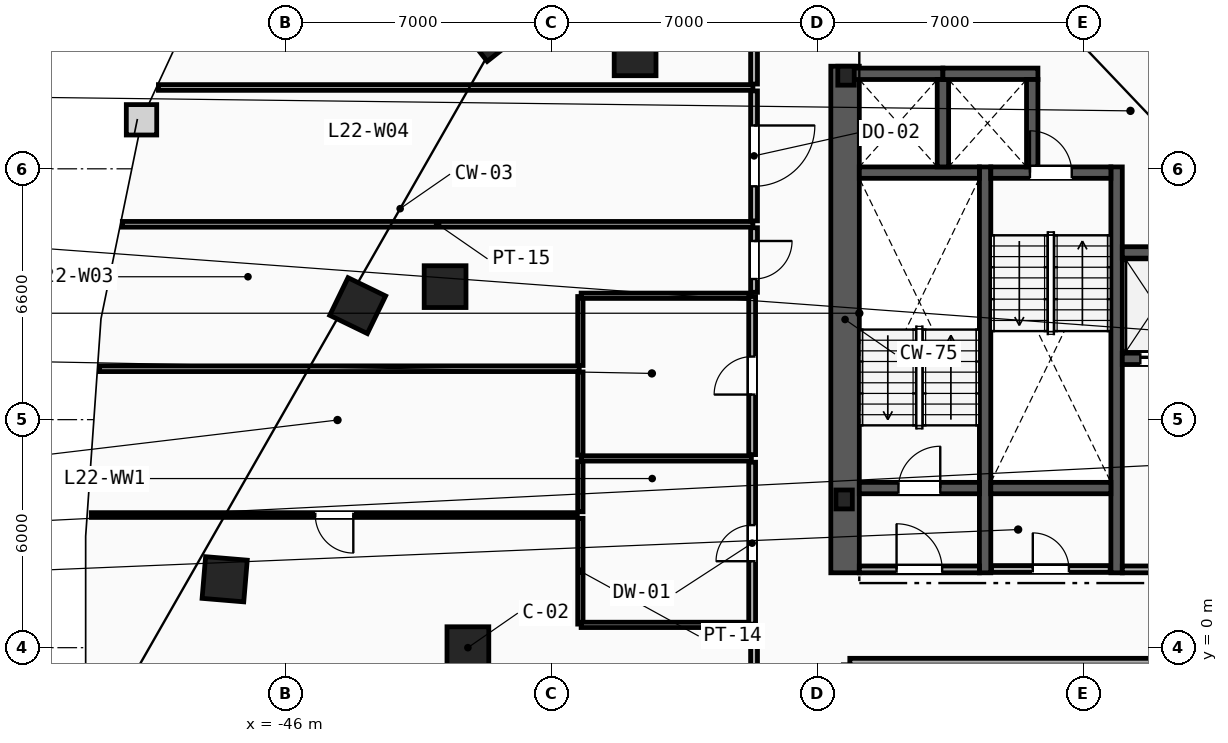
"""IFC4 building model, lengths in metres.
Left out: names, types, materials, properties, quantities, classifications, styles, units other than length and angle.
Written with IfcOpenShell. Run it as: python <this file> out.ifc"""

import sys

from ifc_helpers import new_model, si_unit, direction, frame, frame_2d, origin, origin_2d, place, context, subcontext, project, spatial, rectangle, i_section, extrude, element, fill, save


model = new_model("IFC4")
c1 = context("Model", 3, precision=1e-05, world=origin(), true_north=direction((0.0, 1.0)))
c2 = subcontext(c1, "Body", "Model", "MODEL_VIEW")
j1 = project(units=[si_unit("LENGTHUNIT", "METRE"), si_unit("PLANEANGLEUNIT", "RADIAN")], contexts=[c1])
p1 = place(None, origin())
s1 = spatial("IfcSite", under=j1, at=p1, CompositionType="ELEMENT")
p2 = place(p1, origin())
s2 = spatial("IfcBuilding", under=s1, at=p2, CompositionType="ELEMENT")
p3 = place(p2, frame((0.0, 0.0, 89.0)))
s3 = spatial("IfcBuildingStorey", under=s2, at=p3, CompositionType="ELEMENT", Elevation=89.0)
for number, where, z_axis, x_axis in (
    (1, (-31.3, 3.9, 0.0), (0.0, 0.0, 1.0), (1.0, 0.0, 0.0)),
    (2, (-31.25, 15.05, 0.0), (0.0, 0.0, 1.0), (1.0, 0.0, 0.0)),
):
    element("IfcColumn", number, at=place(p3, frame(where, z_axis=z_axis, x_axis=x_axis)), inside=s3, PredefinedType="COLUMN", context=c2, shape_type="SweptSolid", body=[
        extrude(i_section(OverallWidth=0.432, OverallDepth=0.498, WebThickness=0.056, FlangeThickness=0.089, FilletRadius=0.018, at=origin_2d()), origin(), (0.0, 0.0, 1.0), 3.6),
    ])
for number, where, z_axis, x_axis in (
    (3, (-41.2, 0.0, 0.0), (0.0, 0.0, 1.0), (1.0, 0.0, 0.0)),
    (4, (-41.8, 9.5, 0.0), (0.0, 0.0, 1.0), (1.0, 0.0, 0.0)),
    (5, (-36.8, 15.6, 0.0), (0.0, 0.0, 1.0), (1.0, 0.0, 0.0)),
    (6, (-40.6, 16.2, 0.0), (0.0, 0.0, 1.0), (-0.785, -0.619, 0.0)),
    (7, (-44.1, 9.0, 0.0), (0.0, 0.0, 1.0), (-0.437, -0.899, 0.0)),
    (8, (-47.6, 1.8, 0.0), (0.0, 0.0, 1.0), (-0.084, -0.997, 0.0)),
):
    element("IfcColumn", number, at=place(p3, frame(where, z_axis=z_axis, x_axis=x_axis)), inside=s3, PredefinedType="COLUMN", context=c2, shape_type="SweptSolid", body=[
        extrude(rectangle(XDim=1.1, YDim=1.1, at=origin_2d()), origin(), (0.0, 0.0, 1.0), 3.6),
    ])
p4 = place(p3, frame((-31.275, 1.97, 0.0), z_axis=(0.0, 0.0, 1.0), x_axis=(0.0, 1.0, 0.0)))
e9 = element("IfcWall", 9, at=p4, inside=s3, PredefinedType="SHEAR", context=c2, shape_type="SweptSolid", body=[
    extrude(rectangle(XDim=13.33, YDim=0.75, at=frame_2d((6.665, 0.0))), origin(), (0.0, 0.0, 1.0), 3.3),
])
for number, where, z_axis, x_axis in (
    (10, (-27.59, 1.97, 0.0), (0.0, 0.0, 1.0), (0.0, 1.0, 0.0)),
    (11, (-24.13, 1.97, 0.0), (0.0, 0.0, 1.0), (0.0, 1.0, 0.0)),
):
    element("IfcWall", number, at=place(p3, frame(where, z_axis=z_axis, x_axis=x_axis)), inside=s3, PredefinedType="SHEAR", context=c2, shape_type="SweptSolid", body=[
        extrude(rectangle(XDim=10.68, YDim=0.3, at=frame_2d((5.34, 0.0))), origin(), (0.0, 0.0, 1.0), 3.3),
    ])
p5 = place(p3, frame((-30.9, 4.2, 0.0), z_axis=(0.0, 0.0, 1.0), x_axis=(1.0, 0.0, 0.0)))
e12 = element("IfcWall", 12, at=p5, inside=s3, PredefinedType="SHEAR", context=c2, shape_type="SweptSolid", body=[
    extrude(rectangle(XDim=3.16, YDim=0.3, at=frame_2d((1.58, 0.0))), origin(), (0.0, 0.0, 1.0), 3.3),
])
p6 = place(p5, frame((1.03, 0.0, 0.0)))
e13 = element("IfcOpeningElement", 13, at=p6, cuts=e12, PredefinedType="OPENING", context=c2, shape_type="SweptSolid", body=[
    extrude(rectangle(XDim=1.1, YDim=2.15, at=frame_2d((0.55, 1.075))), frame((0.0, 0.16, 0.0), z_axis=(0.0, -1.0, 0.0), x_axis=(1.0, 0.0, 0.0)), (0.0, 0.0, 1.0), 0.32),
])
p7 = place(p3, frame((-30.9, 12.5, 0.0), z_axis=(0.0, 0.0, 1.0), x_axis=(1.0, 0.0, 0.0)))
e14 = element("IfcWall", 14, at=p7, inside=s3, PredefinedType="SHEAR", context=c2, shape_type="SweptSolid", body=[
    extrude(rectangle(XDim=3.16, YDim=0.3, at=frame_2d((1.58, 0.0))), origin(), (0.0, 0.0, 1.0), 3.3),
])
p8 = place(p3, frame((-27.44, 12.5, 0.0), z_axis=(0.0, 0.0, 1.0), x_axis=(1.0, 0.0, 0.0)))
e15 = element("IfcWall", 15, at=p8, inside=s3, PredefinedType="SHEAR", context=c2, shape_type="SweptSolid", body=[
    extrude(rectangle(XDim=3.16, YDim=0.3, at=frame_2d((1.58, 0.0))), origin(), (0.0, 0.0, 1.0), 3.3),
])
p9 = place(p8, frame((1.03, 0.0, 0.0)))
e16 = element("IfcOpeningElement", 16, at=p9, cuts=e15, PredefinedType="OPENING", context=c2, shape_type="SweptSolid", body=[
    extrude(rectangle(XDim=1.1, YDim=2.15, at=frame_2d((0.55, 1.075))), frame((0.0, 0.16, 0.0), z_axis=(0.0, -1.0, 0.0), x_axis=(1.0, 0.0, 0.0)), (0.0, 0.0, 1.0), 0.32),
])
p10 = place(p3, frame((-27.44, 4.2, 0.0), z_axis=(0.0, 0.0, 1.0), x_axis=(1.0, 0.0, 0.0)))
e17 = element("IfcWall", 17, at=p10, inside=s3, PredefinedType="SHEAR", context=c2, shape_type="SweptSolid", body=[
    extrude(rectangle(XDim=3.16, YDim=0.3, at=frame_2d((1.58, 0.0))), origin(), (0.0, 0.0, 1.0), 3.3),
])
p11 = place(p3, frame((-23.98, 2.06, 0.0), z_axis=(0.0, 0.0, 1.0), x_axis=(1.0, 0.0, 0.0)))
e18 = element("IfcWall", 18, at=p11, inside=s3, PredefinedType="PARTITIONING", context=c2, shape_type="SweptSolid", body=[
    extrude(rectangle(XDim=3.0, YDim=0.18, at=frame_2d((1.5, 0.0))), origin(), (0.0, 0.0, 1.0), 3.3),
])
p12 = place(p11, frame((0.9, 0.0, 0.0)))
e19 = element("IfcOpeningElement", 19, at=p12, cuts=e18, PredefinedType="OPENING", context=c2, shape_type="SweptSolid", body=[
    extrude(rectangle(XDim=1.2, YDim=2.15, at=frame_2d((0.6, 1.075))), frame((0.0, 0.1, 0.0), z_axis=(0.0, -1.0, 0.0), x_axis=(1.0, 0.0, 0.0)), (0.0, 0.0, 1.0), 0.2),
])
p13 = place(p3, frame((-30.9, 2.06, 0.0), z_axis=(0.0, 0.0, 1.0), x_axis=(1.0, 0.0, 0.0)))
e20 = element("IfcWall", 20, at=p13, inside=s3, PredefinedType="PARTITIONING", context=c2, shape_type="SweptSolid", body=[
    extrude(rectangle(XDim=3.16, YDim=0.18, at=frame_2d((1.58, 0.0))), origin(), (0.0, 0.0, 1.0), 3.3),
])
p14 = place(p13, frame((0.98, 0.0, 0.0)))
e21 = element("IfcOpeningElement", 21, at=p14, cuts=e20, PredefinedType="OPENING", context=c2, shape_type="SweptSolid", body=[
    extrude(rectangle(XDim=1.2, YDim=2.15, at=frame_2d((0.6, 1.075))), frame((0.0, 0.1, 0.0), z_axis=(0.0, -1.0, 0.0), x_axis=(1.0, 0.0, 0.0)), (0.0, 0.0, 1.0), 0.2),
])
p15 = place(p3, frame((-23.98, 7.6, 0.0), z_axis=(0.0, 0.0, 1.0), x_axis=(1.0, 0.0, 0.0)))
e22 = element("IfcWall", 22, at=p15, inside=s3, PredefinedType="SHEAR", context=c2, shape_type="SweptSolid", body=[
    extrude(rectangle(XDim=2.1, YDim=0.3, at=frame_2d((1.05, 0.0))), origin(), (0.0, 0.0, 1.0), 3.3),
])
p16 = place(p15, frame((0.475, 0.0, 0.0)))
e23 = element("IfcOpeningElement", 23, at=p16, cuts=e22, PredefinedType="OPENING", context=c2, shape_type="SweptSolid", body=[
    extrude(rectangle(XDim=1.15, YDim=2.2, at=frame_2d((0.575, 1.1))), frame((0.0, 0.16, 0.0), z_axis=(0.0, -1.0, 0.0), x_axis=(1.0, 0.0, 0.0)), (0.0, 0.0, 1.0), 0.32),
])
p17 = place(p3, frame((-23.98, 10.4, 0.0), z_axis=(0.0, 0.0, 1.0), x_axis=(1.0, 0.0, 0.0)))
e24 = element("IfcWall", 24, at=p17, inside=s3, PredefinedType="SHEAR", context=c2, shape_type="SweptSolid", body=[
    extrude(rectangle(XDim=2.1, YDim=0.3, at=frame_2d((1.05, 0.0))), origin(), (0.0, 0.0, 1.0), 3.3),
])
p18 = place(p3, frame((-31.2, 15.1, 0.0), z_axis=(0.0, 0.0, 1.0), x_axis=(1.0, 0.0, 0.0)))
e25 = element("IfcWall", 25, at=p18, inside=s3, PredefinedType="SHEAR", context=c2, shape_type="SweptSolid", body=[
    extrude(rectangle(XDim=2.5, YDim=0.3, at=frame_2d((1.25, 0.0))), origin(), (0.0, 0.0, 1.0), 3.3),
])
p19 = place(p3, frame((-28.7, 12.65, 0.0), z_axis=(0.0, 0.0, 1.0), x_axis=(0.0, 1.0, 0.0)))
e26 = element("IfcWall", 26, at=p19, inside=s3, PredefinedType="SHEAR", context=c2, shape_type="SweptSolid", body=[
    extrude(rectangle(XDim=2.3, YDim=0.3, at=frame_2d((1.15, 0.0))), origin(), (0.0, 0.0, 1.0), 3.3),
])
p20 = place(p3, frame((-28.7, 15.1, 0.0), z_axis=(0.0, 0.0, 1.0), x_axis=(1.0, 0.0, 0.0)))
e27 = element("IfcWall", 27, at=p20, inside=s3, PredefinedType="SHEAR", context=c2, shape_type="SweptSolid", body=[
    extrude(rectangle(XDim=2.5, YDim=0.3, at=frame_2d((1.25, 0.0))), origin(), (0.0, 0.0, 1.0), 3.3),
])
p21 = place(p3, frame((-26.35, 12.65, 0.0), z_axis=(0.0, 0.0, 1.0), x_axis=(0.0, 1.0, 0.0)))
e28 = element("IfcWall", 28, at=p21, inside=s3, PredefinedType="SHEAR", context=c2, shape_type="SweptSolid", body=[
    extrude(rectangle(XDim=2.3, YDim=0.3, at=frame_2d((1.15, 0.0))), origin(), (0.0, 0.0, 1.0), 3.3),
])
p22 = place(p3, frame((-27.42, 2.07, 0.0), z_axis=(0.0, 0.0, 1.0), x_axis=(1.0, 0.0, 0.0)))
e29 = element("IfcWall", 29, at=p22, inside=s3, PredefinedType="PARTITIONING", context=c2, shape_type="SweptSolid", body=[
    extrude(rectangle(XDim=3.12, YDim=0.18, at=frame_2d((1.56, 0.0))), origin(), (0.0, 0.0, 1.0), 3.3),
])
p23 = place(p22, frame((1.085, 0.0, 0.0)))
e30 = element("IfcOpeningElement", 30, at=p23, cuts=e29, PredefinedType="OPENING", context=c2, shape_type="SweptSolid", body=[
    extrude(rectangle(XDim=0.95, YDim=2.1, at=frame_2d((0.475, 1.05))), frame((0.0, 0.1, 0.0), z_axis=(0.0, -1.0, 0.0), x_axis=(1.0, 0.0, 0.0)), (0.0, 0.0, 1.0), 0.2),
])
p24 = place(p3, frame((-38.24, 0.62, 0.0), z_axis=(0.0, 0.0, 1.0), x_axis=(0.0, 1.0, 0.0)))
e31 = element("IfcWall", 31, at=p24, inside=s3, PredefinedType="PARTITIONING", context=c2, shape_type="SweptSolid", body=[
    extrude(rectangle(XDim=2.785, YDim=0.14, at=frame_2d((1.393, 0.0))), origin(), (0.0, 0.0, 1.0), 3.3),
])
p25 = place(p3, frame((-38.24, 3.575, 0.0), z_axis=(0.0, 0.0, 1.0), x_axis=(0.0, 1.0, 0.0)))
e32 = element("IfcWall", 32, at=p25, inside=s3, PredefinedType="PARTITIONING", context=c2, shape_type="SweptSolid", body=[
    extrude(rectangle(XDim=1.32, YDim=0.14, at=frame_2d((0.66, 0.0))), origin(), (0.0, 0.0, 1.0), 3.3),
])
p26 = place(p3, frame((-38.24, 5.065, 0.0), z_axis=(0.0, 0.0, 1.0), x_axis=(0.0, 1.0, 0.0)))
e33 = element("IfcWall", 33, at=p26, inside=s3, PredefinedType="PARTITIONING", context=c2, shape_type="SweptSolid", body=[
    extrude(rectangle(XDim=2.19, YDim=0.14, at=frame_2d((1.095, 0.0))), origin(), (0.0, 0.0, 1.0), 3.3),
])
p27 = place(p3, frame((-38.24, 7.425, 0.0), z_axis=(0.0, 0.0, 1.0), x_axis=(0.0, 1.0, 0.0)))
e34 = element("IfcWall", 34, at=p27, inside=s3, PredefinedType="PARTITIONING", context=c2, shape_type="SweptSolid", body=[
    extrude(rectangle(XDim=1.815, YDim=0.14, at=frame_2d((0.907, 0.0))), origin(), (0.0, 0.0, 1.0), 3.3),
])
for number, where, z_axis, x_axis in (
    (35, (-38.22, 0.6, 0.0), (0.0, 0.0, 1.0), (1.0, 0.0, 0.0)),
    (36, (-38.22, 4.98, 0.0), (0.0, 0.0, 1.0), (1.0, 0.0, 0.0)),
    (37, (-38.22, 9.26, 0.0), (0.0, 0.0, 1.0), (1.0, 0.0, 0.0)),
):
    element("IfcWall", number, at=place(p3, frame(where, z_axis=z_axis, x_axis=x_axis)), inside=s3, PredefinedType="PARTITIONING", context=c2, shape_type="SweptSolid", body=[
        extrude(rectangle(XDim=4.48, YDim=0.14, at=frame_2d((2.24, 0.0))), origin(), (0.0, 0.0, 1.0), 3.3),
    ])
p28 = place(p3, frame((-33.72, 0.62, 0.0), z_axis=(0.0, 0.0, 1.0), x_axis=(0.0, 1.0, 0.0)))
e38 = element("IfcWall", 38, at=p28, inside=s3, PredefinedType="PARTITIONING", context=c2, shape_type="SweptSolid", body=[
    extrude(rectangle(XDim=4.26, YDim=0.18, at=frame_2d((2.13, 0.0))), origin(), (0.0, 0.0, 1.0), 3.3),
])
p29 = place(p28, frame((1.655, 0.0, 0.0)))
e39 = element("IfcOpeningElement", 39, at=p29, cuts=e38, PredefinedType="OPENING", context=c2, shape_type="SweptSolid", body=[
    extrude(rectangle(XDim=0.95, YDim=2.1, at=frame_2d((0.475, 1.05))), frame((0.0, 0.1, 0.0), z_axis=(0.0, -1.0, 0.0), x_axis=(1.0, 0.0, 0.0)), (0.0, 0.0, 1.0), 0.2),
])
p30 = place(p3, frame((-33.72, 5.08, 0.0), z_axis=(0.0, 0.0, 1.0), x_axis=(0.0, 1.0, 0.0)))
e40 = element("IfcWall", 40, at=p30, inside=s3, PredefinedType="PARTITIONING", context=c2, shape_type="SweptSolid", body=[
    extrude(rectangle(XDim=4.16, YDim=0.18, at=frame_2d((2.08, 0.0))), origin(), (0.0, 0.0, 1.0), 3.3),
])
p31 = place(p30, frame((1.58, 0.0, 0.0)))
e41 = element("IfcOpeningElement", 41, at=p31, cuts=e40, PredefinedType="OPENING", context=c2, shape_type="SweptSolid", body=[
    extrude(rectangle(XDim=1.0, YDim=2.15, at=frame_2d((0.5, 1.075))), frame((0.0, 0.1, 0.0), z_axis=(0.0, -1.0, 0.0), x_axis=(1.0, 0.0, 0.0)), (0.0, 0.0, 1.0), 0.2),
])
p32 = place(p3, frame((-50.897, 7.34, 0.0), z_axis=(0.0, 0.0, 1.0), x_axis=(1.0, 0.0, 0.0)))
e42 = element("IfcWall", 42, at=p32, inside=s3, PredefinedType="PARTITIONING", context=c2, shape_type="SweptSolid", body=[
    extrude(rectangle(XDim=12.627, YDim=0.15, at=frame_2d((6.314, 0.0))), origin(), (0.0, 0.0, 1.0), 3.3),
])
p33 = place(p3, frame((-50.293, 11.14, 0.0), z_axis=(0.0, 0.0, 1.0), x_axis=(1.0, 0.0, 0.0)))
e43 = element("IfcWall", 43, at=p33, inside=s3, PredefinedType="PARTITIONING", context=c2, shape_type="SweptSolid", body=[
    extrude(rectangle(XDim=16.593, YDim=0.15, at=frame_2d((8.296, 0.0))), origin(), (0.0, 0.0, 1.0), 3.3),
])
p34 = place(p3, frame((-49.343, 14.74, 0.0), z_axis=(0.0, 0.0, 1.0), x_axis=(1.0, 0.0, 0.0)))
e44 = element("IfcWall", 44, at=p34, inside=s3, PredefinedType="PARTITIONING", context=c2, shape_type="SweptSolid", body=[
    extrude(rectangle(XDim=15.643, YDim=0.15, at=frame_2d((7.822, 0.0))), origin(), (0.0, 0.0, 1.0), 3.3),
])
p35 = place(p3, frame((-31.15, -0.37, 0.0), z_axis=(0.0, 0.0, 1.0), x_axis=(1.0, 0.0, 0.0)))
e45 = element("IfcWall", 45, at=p35, inside=s3, PredefinedType="PARTITIONING", context=c2, shape_type="SweptSolid", body=[
    extrude(rectangle(XDim=14.328, YDim=0.18, at=frame_2d((7.164, 0.0))), origin(), (0.0, 0.0, 1.0), 3.3),
])
p36 = place(p3, frame((-33.67, 0.509, 0.0), z_axis=(0.0, 0.0, 1.0), x_axis=(0.0, -1.0, 0.0)))
e46 = element("IfcWall", 46, at=p36, inside=s3, PredefinedType="PARTITIONING", context=c2, shape_type="SweptSolid", body=[
    extrude(rectangle(XDim=11.908, YDim=0.18, at=frame_2d((5.954, 0.0))), origin(), (0.0, 0.0, 1.0), 3.3),
])
p37 = place(p3, frame((-33.67, 17.428, 0.0), z_axis=(0.0, 0.0, 1.0), x_axis=(0.0, -1.0, 0.0)))
e47 = element("IfcWall", 47, at=p37, inside=s3, PredefinedType="PARTITIONING", context=c2, shape_type="SweptSolid", body=[
    extrude(rectangle(XDim=2.598, YDim=0.18, at=frame_2d((1.299, 0.0))), origin(), (0.0, 0.0, 1.0), 3.3),
])
p38 = place(p3, frame((-33.67, 11.05, 0.0), z_axis=(0.0, 0.0, 1.0), x_axis=(0.0, -1.0, 0.0)))
e48 = element("IfcWall", 48, at=p38, inside=s3, PredefinedType="PARTITIONING", context=c2, shape_type="SweptSolid", body=[
    extrude(rectangle(XDim=1.699, YDim=0.18, at=frame_2d((0.849, 0.0))), origin(), (0.0, 0.0, 1.0), 3.3),
])
p39 = place(p38, frame((0.349, 0.0, 0.0)))
e49 = element("IfcOpeningElement", 49, at=p39, cuts=e48, PredefinedType="OPENING", context=c2, shape_type="SweptSolid", body=[
    extrude(rectangle(XDim=1.0, YDim=2.15, at=frame_2d((0.5, 1.075))), frame((0.0, 0.1, 0.0), z_axis=(0.0, -1.0, 0.0), x_axis=(1.0, 0.0, 0.0)), (0.0, 0.0, 1.0), 0.2),
])
p40 = place(p3, frame((-33.67, 14.65, 0.0), z_axis=(0.0, 0.0, 1.0), x_axis=(0.0, -1.0, 0.0)))
e50 = element("IfcWall", 50, at=p40, inside=s3, PredefinedType="PARTITIONING", context=c2, shape_type="SweptSolid", body=[
    extrude(rectangle(XDim=3.42, YDim=0.18, at=frame_2d((1.71, 0.0))), origin(), (0.0, 0.0, 1.0), 3.3),
])
p41 = place(p40, frame((0.91, 0.0, 0.0)))
e51 = element("IfcOpeningElement", 51, at=p41, cuts=e50, PredefinedType="OPENING", context=c2, shape_type="SweptSolid", body=[
    extrude(rectangle(XDim=1.6, YDim=2.2, at=frame_2d((0.8, 1.1))), frame((0.0, 0.1, 0.0), z_axis=(0.0, -1.0, 0.0), x_axis=(1.0, 0.0, 0.0)), (0.0, 0.0, 1.0), 0.2),
])
p42 = place(p3, frame((-38.32, 3.49, 0.0), z_axis=(0.0, 0.0, 1.0), x_axis=(-1.0, 0.0, 0.0)))
e52 = element("IfcWall", 52, at=p42, inside=s3, PredefinedType="PARTITIONING", context=c2, shape_type="SweptSolid", body=[
    extrude(rectangle(XDim=12.79, YDim=0.125, at=frame_2d((6.395, 0.0))), origin(), (0.0, 0.0, 1.0), 3.3),
])
p43 = place(p42, frame((5.895, 0.0, 0.0)))
e53 = element("IfcOpeningElement", 53, at=p43, cuts=e52, PredefinedType="OPENING", context=c2, shape_type="SweptSolid", body=[
    extrude(rectangle(XDim=1.0, YDim=2.15, at=frame_2d((0.5, 1.075))), frame((0.0, 0.073, 0.0), z_axis=(0.0, -1.0, 0.0), x_axis=(1.0, 0.0, 0.0)), (0.0, 0.0, 1.0), 0.145),
])
p44 = place(p6, origin())
e54 = element("IfcDoor", 54, at=p44, inside=s3, OperationType="SINGLE_SWING_RIGHT", PredefinedType="DOOR", context=c2, shape_type="SweptSolid", body=[
    extrude(rectangle(XDim=1.1, YDim=2.15, at=frame_2d((0.55, 1.075))), frame((0.0, 0.025, 0.0), z_axis=(0.0, -1.0, 0.0), x_axis=(1.0, 0.0, 0.0)), (0.0, 0.0, 1.0), 0.05),
])
fill(e13, e54)
p45 = place(p9, origin())
e55 = element("IfcDoor", 55, at=p45, inside=s3, OperationType="SINGLE_SWING_LEFT", PredefinedType="DOOR", context=c2, shape_type="SweptSolid", body=[
    extrude(rectangle(XDim=1.1, YDim=2.15, at=frame_2d((0.55, 1.075))), frame((0.0, 0.025, 0.0), z_axis=(0.0, -1.0, 0.0), x_axis=(1.0, 0.0, 0.0)), (0.0, 0.0, 1.0), 0.05),
])
fill(e16, e55)
p46 = place(p14, origin())
e56 = element("IfcDoor", 56, at=p46, inside=s3, OperationType="SINGLE_SWING_LEFT", PredefinedType="DOOR", context=c2, shape_type="SweptSolid", body=[
    extrude(rectangle(XDim=1.2, YDim=2.15, at=frame_2d((0.6, 1.075))), frame((0.0, 0.025, 0.0), z_axis=(0.0, -1.0, 0.0), x_axis=(1.0, 0.0, 0.0)), (0.0, 0.0, 1.0), 0.05),
])
fill(e21, e56)
p47 = place(p16, origin())
e57 = element("IfcDoor", 57, at=p47, inside=s3, OperationType="SLIDING_TO_LEFT", PredefinedType="TRAPDOOR", context=c2, shape_type="SweptSolid", body=[
    extrude(rectangle(XDim=1.15, YDim=2.2, at=frame_2d((0.575, 1.1))), frame((0.0, 0.025, 0.0), z_axis=(0.0, -1.0, 0.0), x_axis=(1.0, 0.0, 0.0)), (0.0, 0.0, 1.0), 0.05),
])
fill(e23, e57)
p48 = place(p43, origin())
e58 = element("IfcDoor", 58, at=p48, inside=s3, OperationType="SINGLE_SWING_LEFT", PredefinedType="DOOR", context=c2, shape_type="SweptSolid", body=[
    extrude(rectangle(XDim=1.0, YDim=2.15, at=frame_2d((0.5, 1.075))), frame((0.0, 0.025, 0.0), z_axis=(0.0, -1.0, 0.0), x_axis=(1.0, 0.0, 0.0)), (0.0, 0.0, 1.0), 0.05),
])
fill(e53, e58)
p49 = place(p29, origin())
e59 = element("IfcDoor", 59, at=p49, inside=s3, OperationType="SINGLE_SWING_LEFT", PredefinedType="DOOR", context=c2, shape_type="SweptSolid", body=[
    extrude(rectangle(XDim=0.95, YDim=2.1, at=frame_2d((0.475, 1.05))), frame((0.0, 0.025, 0.0), z_axis=(0.0, -1.0, 0.0), x_axis=(1.0, 0.0, 0.0)), (0.0, 0.0, 1.0), 0.05),
])
fill(e39, e59)
p50 = place(p31, origin())
e60 = element("IfcDoor", 60, at=p50, inside=s3, OperationType="SINGLE_SWING_LEFT", PredefinedType="DOOR", context=c2, shape_type="SweptSolid", body=[
    extrude(rectangle(XDim=1.0, YDim=2.15, at=frame_2d((0.5, 1.075))), frame((0.0, 0.025, 0.0), z_axis=(0.0, -1.0, 0.0), x_axis=(1.0, 0.0, 0.0)), (0.0, 0.0, 1.0), 0.05),
])
fill(e41, e60)
p51 = place(p41, origin())
e61 = element("IfcDoor", 61, at=p51, inside=s3, OperationType="SINGLE_SWING_LEFT", PredefinedType="DOOR", context=c2, shape_type="SweptSolid", body=[
    extrude(rectangle(XDim=1.6, YDim=2.2, at=frame_2d((0.8, 1.1))), frame((0.0, 0.025, 0.0), z_axis=(0.0, -1.0, 0.0), x_axis=(1.0, 0.0, 0.0)), (0.0, 0.0, 1.0), 0.05),
])
fill(e51, e61)
p52 = place(p23, origin())
e62 = element("IfcDoor", 62, at=p52, inside=s3, OperationType="SINGLE_SWING_LEFT", PredefinedType="DOOR", context=c2, shape_type="SweptSolid", body=[
    extrude(rectangle(XDim=0.95, YDim=2.1, at=frame_2d((0.475, 1.05))), frame((0.0, 0.025, 0.0), z_axis=(0.0, -1.0, 0.0), x_axis=(1.0, 0.0, 0.0)), (0.0, 0.0, 1.0), 0.05),
])
fill(e30, e62)
p53 = place(p39, origin())
e63 = element("IfcDoor", 63, at=p53, inside=s3, OperationType="SINGLE_SWING_LEFT", PredefinedType="DOOR", context=c2, shape_type="SweptSolid", body=[
    extrude(rectangle(XDim=1.0, YDim=2.15, at=frame_2d((0.5, 1.075))), frame((0.0, 0.025, 0.0), z_axis=(0.0, -1.0, 0.0), x_axis=(1.0, 0.0, 0.0)), (0.0, 0.0, 1.0), 0.05),
])
fill(e49, e63)
save(model, sys.argv[1])
